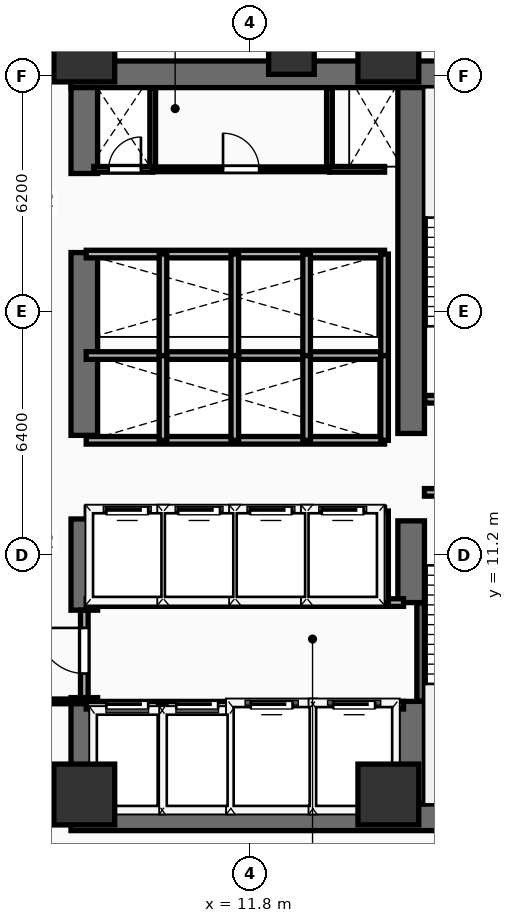
"""IFC4 building model, lengths in metres.
Left out: names, types, materials, properties, quantities, classifications, styles, units other than length and angle.
Written with IfcOpenShell. Run it as: python <this file> out.ifc"""

import sys

from ifc_helpers import new_model, si_unit, direction, frame, frame_2d, origin, origin_2d, place, context, subcontext, project, spatial, rectangle, extrude, element, fill, save


model = new_model("IFC4")
c1 = context("Model", 3, precision=1e-05, world=origin(), true_north=direction((0.0, 1.0)))
c2 = subcontext(c1, "Body", "Model", "MODEL_VIEW")
j1 = project(units=[si_unit("LENGTHUNIT", "METRE"), si_unit("PLANEANGLEUNIT", "RADIAN")], contexts=[c1])
p1 = place(None, origin())
s1 = spatial("IfcSite", under=j1, at=p1, CompositionType="ELEMENT")
p2 = place(p1, origin())
s2 = spatial("IfcBuilding", under=s1, at=p2, CompositionType="ELEMENT")
p3 = place(p2, frame((0.0, 0.0, 33.4)))
s3 = spatial("IfcBuildingStorey", under=s2, at=p3, CompositionType="ELEMENT", Elevation=33.4)
for number, where, z_axis, x_axis in (
    (1, (7.1, 4.3, 0.0), (0.0, 0.0, 1.0), (1.0, 0.0, 0.0)),
    (2, (7.1, 23.85, 0.0), (0.0, 0.0, 1.0), (1.0, 0.0, 0.0)),
):
    element("IfcWall", number, at=place(p3, frame(where, z_axis=z_axis, x_axis=x_axis)), inside=s3, PredefinedType="SHEAR", context=c2, shape_type="SweptSolid", body=[
        extrude(rectangle(XDim=14.05, YDim=0.7, at=frame_2d((7.025, 0.0))), origin(), (0.0, 0.0, 1.0), 3.54),
    ])
p4 = place(p3, frame((7.45, 4.65, 0.0), z_axis=(0.0, 0.0, 1.0), x_axis=(0.0, 1.0, 0.0)))
e3 = element("IfcWall", 3, at=p4, inside=s3, PredefinedType="SHEAR", context=c2, shape_type="SweptSolid", body=[
    extrude(rectangle(XDim=2.8, YDim=0.7, at=frame_2d((1.4, 0.0))), origin(), (0.0, 0.0, 1.0), 3.54),
])
p5 = place(p3, frame((7.45, 9.75, 0.0), z_axis=(0.0, 0.0, 1.0), x_axis=(0.0, 1.0, 0.0)))
e4 = element("IfcWall", 4, at=p5, inside=s3, PredefinedType="SHEAR", context=c2, shape_type="SweptSolid", body=[
    extrude(rectangle(XDim=2.4, YDim=0.7, at=frame_2d((1.2, 0.0))), origin(), (0.0, 0.0, 1.0), 3.54),
])
p6 = place(p3, frame((7.45, 14.35, 0.0), z_axis=(0.0, 0.0, 1.0), x_axis=(0.0, 1.0, 0.0)))
e5 = element("IfcWall", 5, at=p6, inside=s3, PredefinedType="SHEAR", context=c2, shape_type="SweptSolid", body=[
    extrude(rectangle(XDim=4.81, YDim=0.7, at=frame_2d((2.405, 0.0))), origin(), (0.0, 0.0, 1.0), 3.54),
])
p7 = place(p3, frame((7.45, 21.24, 0.0), z_axis=(0.0, 0.0, 1.0), x_axis=(0.0, 1.0, 0.0)))
e6 = element("IfcWall", 6, at=p7, inside=s3, PredefinedType="SHEAR", context=c2, shape_type="SweptSolid", body=[
    extrude(rectangle(XDim=2.26, YDim=0.7, at=frame_2d((1.13, 0.0))), origin(), (0.0, 0.0, 1.0), 3.54),
])
p8 = place(p3, frame((16.05, 4.65, 0.0), z_axis=(0.0, 0.0, 1.0), x_axis=(0.0, 1.0, 0.0)))
e7 = element("IfcWall", 7, at=p8, inside=s3, PredefinedType="SHEAR", context=c2, shape_type="SweptSolid", body=[
    extrude(rectangle(XDim=2.7, YDim=0.7, at=frame_2d((1.35, 0.0))), origin(), (0.0, 0.0, 1.0), 3.54),
])
p9 = place(p3, frame((16.05, 9.95, 0.0), z_axis=(0.0, 0.0, 1.0), x_axis=(0.0, 1.0, 0.0)))
e8 = element("IfcWall", 8, at=p9, inside=s3, PredefinedType="SHEAR", context=c2, shape_type="SweptSolid", body=[
    extrude(rectangle(XDim=2.15, YDim=0.7, at=frame_2d((1.075, 0.0))), origin(), (0.0, 0.0, 1.0), 3.54),
])
p10 = place(p3, frame((16.05, 14.4, 0.0), z_axis=(0.0, 0.0, 1.0), x_axis=(0.0, 1.0, 0.0)))
e9 = element("IfcWall", 9, at=p10, inside=s3, PredefinedType="SHEAR", context=c2, shape_type="SweptSolid", body=[
    extrude(rectangle(XDim=9.1, YDim=0.7, at=frame_2d((4.55, 0.0))), origin(), (0.0, 0.0, 1.0), 3.54),
])
for number, where, z_axis, x_axis in (
    (10, (7.45, 4.9, 0.0), (0.0, 0.0, 1.0), (1.0, 0.0, 0.0)),
    (11, (15.45, 4.9, 0.0), (0.0, 0.0, 1.0), (1.0, 0.0, 0.0)),
    (12, (7.45, 24.45, 0.0), (0.0, 0.0, 1.0), (1.0, 0.0, 0.0)),
    (13, (15.45, 24.45, 0.0), (0.0, 0.0, 1.0), (1.0, 0.0, 0.0)),
):
    element("IfcColumn", number, at=place(p3, frame(where, z_axis=z_axis, x_axis=x_axis)), inside=s3, PredefinedType="COLUMN", context=c2, shape_type="SweptSolid", body=[
        extrude(rectangle(XDim=1.6, YDim=1.6, at=origin_2d()), origin(), (0.0, 0.0, 1.0), 3.54),
    ])
p11 = place(p3, frame((12.9, 24.45, 0.0), z_axis=(0.0, 0.0, 1.0), x_axis=(1.0, 0.0, 0.0)))
e14 = element("IfcColumn", 14, at=p11, inside=s3, PredefinedType="COLUMN", context=c2, shape_type="SweptSolid", body=[
    extrude(rectangle(XDim=1.2, YDim=1.2, at=origin_2d()), origin(), (0.0, 0.0, 1.0), 3.54),
])
p12 = place(p3, frame((16.3, 7.36, 0.0), z_axis=(0.0, 0.0, 1.0), x_axis=(0.0, 1.0, 0.0)))
e15 = element("IfcWall", 15, at=p12, inside=s3, PredefinedType="SHEAR", context=c2, shape_type="SweptSolid", body=[
    extrude(rectangle(XDim=2.58, YDim=0.2, at=frame_2d((1.29, 0.0))), origin(), (0.0, 0.0, 1.0), 3.54),
])
p13 = place(p3, frame((16.4, 12.85, 0.0), z_axis=(0.0, 0.0, 1.0), x_axis=(1.0, 0.0, 0.0)))
e16 = element("IfcWall", 16, at=p13, inside=s3, PredefinedType="PARTITIONING", context=c2, shape_type="SweptSolid", body=[
    extrude(rectangle(XDim=3.96, YDim=0.2, at=frame_2d((1.98, 0.0))), origin(), (0.0, 0.0, 1.0), 3.54),
])
p14 = place(p13, frame((1.304, 0.0, 0.0)))
e17 = element("IfcOpeningElement", 17, at=p14, cuts=e16, PredefinedType="OPENING", context=c2, shape_type="SweptSolid", body=[
    extrude(rectangle(XDim=1.1, YDim=2.2, at=frame_2d((0.55, 1.1))), frame((0.0, 0.11, 0.0), z_axis=(0.0, -1.0, 0.0), x_axis=(1.0, 0.0, 0.0)), (0.0, 0.0, 1.0), 0.22),
])
p15 = place(p3, frame((16.41, 15.3, 0.0), z_axis=(0.0, 0.0, 1.0), x_axis=(1.0, 0.0, 0.0)))
e18 = element("IfcWall", 18, at=p15, inside=s3, PredefinedType="PARTITIONING", context=c2, shape_type="SweptSolid", body=[
    extrude(rectangle(XDim=3.95, YDim=0.2, at=frame_2d((1.975, 0.0))), origin(), (0.0, 0.0, 1.0), 3.54),
])
p16 = place(p15, frame((1.294, 0.0, 0.0)))
e19 = element("IfcOpeningElement", 19, at=p16, cuts=e18, PredefinedType="OPENING", context=c2, shape_type="SweptSolid", body=[
    extrude(rectangle(XDim=1.1, YDim=2.2, at=frame_2d((0.55, 1.1))), frame((0.0, 0.11, 0.0), z_axis=(0.0, -1.0, 0.0), x_axis=(1.0, 0.0, 0.0)), (0.0, 0.0, 1.0), 0.22),
])
p17 = place(p3, frame((7.5, 7.25, 0.0), z_axis=(0.0, 0.0, 1.0), x_axis=(1.0, 0.0, 0.0)))
e20 = element("IfcWall", 20, at=p17, inside=s3, PredefinedType="PARTITIONING", context=c2, shape_type="SweptSolid", body=[
    extrude(rectangle(XDim=8.35, YDim=0.2, at=frame_2d((4.175, 0.0))), origin(), (0.0, 0.0, 1.0), 3.54),
])
p18 = place(p17, frame((0.53, 0.0, 0.0)))
e21 = element("IfcOpeningElement", 21, at=p18, cuts=e20, PredefinedType="OPENING", context=c2, shape_type="SweptSolid", body=[
    extrude(rectangle(XDim=1.1, YDim=2.2, at=frame_2d((0.55, 1.1))), frame((0.0, 0.11, 0.0), z_axis=(0.0, -1.0, 0.0), x_axis=(1.0, 0.0, 0.0)), (0.0, 0.0, 1.0), 0.22),
])
p19 = place(p17, frame((2.37, 0.0, 0.0)))
e22 = element("IfcOpeningElement", 22, at=p19, cuts=e20, PredefinedType="OPENING", context=c2, shape_type="SweptSolid", body=[
    extrude(rectangle(XDim=1.1, YDim=2.2, at=frame_2d((0.55, 1.1))), frame((0.0, 0.11, 0.0), z_axis=(0.0, -1.0, 0.0), x_axis=(1.0, 0.0, 0.0)), (0.0, 0.0, 1.0), 0.22),
])
p20 = place(p17, frame((4.33, 0.0, 0.0)))
e23 = element("IfcOpeningElement", 23, at=p20, cuts=e20, PredefinedType="OPENING", context=c2, shape_type="SweptSolid", body=[
    extrude(rectangle(XDim=1.1, YDim=2.2, at=frame_2d((0.55, 1.1))), frame((0.0, 0.11, 0.0), z_axis=(0.0, -1.0, 0.0), x_axis=(1.0, 0.0, 0.0)), (0.0, 0.0, 1.0), 0.22),
])
p21 = place(p17, frame((6.5, 0.0, 0.0)))
e24 = element("IfcOpeningElement", 24, at=p21, cuts=e20, PredefinedType="OPENING", context=c2, shape_type="SweptSolid", body=[
    extrude(rectangle(XDim=1.1, YDim=2.2, at=frame_2d((0.55, 1.1))), frame((0.0, 0.11, 0.0), z_axis=(0.0, -1.0, 0.0), x_axis=(1.0, 0.0, 0.0)), (0.0, 0.0, 1.0), 0.22),
])
p22 = place(p3, frame((7.5, 9.95, 0.0), z_axis=(0.0, 0.0, 1.0), x_axis=(1.0, 0.0, 0.0)))
e25 = element("IfcWall", 25, at=p22, inside=s3, PredefinedType="PARTITIONING", context=c2, shape_type="SweptSolid", body=[
    extrude(rectangle(XDim=8.35, YDim=0.2, at=frame_2d((4.175, 0.0))), origin(), (0.0, 0.0, 1.0), 3.54),
])
for number, where, z_axis, x_axis in (
    (26, (9.5, 4.45, 0.0), (0.0, 0.0, 1.0), (0.0, 1.0, 0.0)),
    (27, (11.36, 4.45, 0.0), (0.0, 0.0, 1.0), (0.0, 1.0, 0.0)),
    (28, (13.46, 4.45, 0.0), (0.0, 0.0, 1.0), (0.0, 1.0, 0.0)),
):
    element("IfcWall", number, at=place(p3, frame(where, z_axis=z_axis, x_axis=x_axis)), inside=s3, PredefinedType="PARTITIONING", context=c2, shape_type="SweptSolid", body=[
        extrude(rectangle(XDim=2.8, YDim=0.2, at=frame_2d((1.4, 0.0))), origin(), (0.0, 0.0, 1.0), 3.54),
    ])
p23 = place(p3, frame((7.45, 7.45, 0.0), z_axis=(0.0, 0.0, 1.0), x_axis=(0.0, 1.0, 0.0)))
e29 = element("IfcWall", 29, at=p23, inside=s3, PredefinedType="PARTITIONING", context=c2, shape_type="SweptSolid", body=[
    extrude(rectangle(XDim=2.3, YDim=0.2, at=frame_2d((1.15, 0.0))), origin(), (0.0, 0.0, 1.0), 2.52),
])
p24 = place(p23, frame((0.633, 0.0, 0.0)))
e30 = element("IfcOpeningElement", 30, at=p24, cuts=e29, PredefinedType="OPENING", context=c2, shape_type="SweptSolid", body=[
    extrude(rectangle(XDim=1.2, YDim=2.25, at=frame_2d((0.6, 1.125))), frame((0.0, 0.11, 0.0), z_axis=(0.0, -1.0, 0.0), x_axis=(1.0, 0.0, 0.0)), (0.0, 0.0, 1.0), 0.22),
])
p25 = place(p3, frame((7.5, 12.36, 0.0), z_axis=(0.0, 0.0, 1.0), x_axis=(1.0, 0.0, 0.0)))
e31 = element("IfcWall", 31, at=p25, inside=s3, PredefinedType="PARTITIONING", context=c2, shape_type="SweptSolid", body=[
    extrude(rectangle(XDim=7.85, YDim=0.2, at=frame_2d((3.925, 0.0))), origin(), (0.0, 0.0, 1.0), 3.54),
])
p26 = place(p25, frame((0.53, 0.0, 0.0)))
e32 = element("IfcOpeningElement", 32, at=p26, cuts=e31, PredefinedType="OPENING", context=c2, shape_type="SweptSolid", body=[
    extrude(rectangle(XDim=1.1, YDim=2.2, at=frame_2d((0.55, 1.1))), frame((0.0, 0.11, 0.0), z_axis=(0.0, -1.0, 0.0), x_axis=(1.0, 0.0, 0.0)), (0.0, 0.0, 1.0), 0.22),
])
p27 = place(p25, frame((2.42, 0.0, 0.0)))
e33 = element("IfcOpeningElement", 33, at=p27, cuts=e31, PredefinedType="OPENING", context=c2, shape_type="SweptSolid", body=[
    extrude(rectangle(XDim=1.1, YDim=2.2, at=frame_2d((0.55, 1.1))), frame((0.0, 0.11, 0.0), z_axis=(0.0, -1.0, 0.0), x_axis=(1.0, 0.0, 0.0)), (0.0, 0.0, 1.0), 0.22),
])
p28 = place(p25, frame((4.31, 0.0, 0.0)))
e34 = element("IfcOpeningElement", 34, at=p28, cuts=e31, PredefinedType="OPENING", context=c2, shape_type="SweptSolid", body=[
    extrude(rectangle(XDim=1.1, YDim=2.2, at=frame_2d((0.55, 1.1))), frame((0.0, 0.11, 0.0), z_axis=(0.0, -1.0, 0.0), x_axis=(1.0, 0.0, 0.0)), (0.0, 0.0, 1.0), 0.22),
])
p29 = place(p25, frame((6.2, 0.0, 0.0)))
e35 = element("IfcOpeningElement", 35, at=p29, cuts=e31, PredefinedType="OPENING", context=c2, shape_type="SweptSolid", body=[
    extrude(rectangle(XDim=1.1, YDim=2.2, at=frame_2d((0.55, 1.1))), frame((0.0, 0.11, 0.0), z_axis=(0.0, -1.0, 0.0), x_axis=(1.0, 0.0, 0.0)), (0.0, 0.0, 1.0), 0.22),
])
for number, where, z_axis, x_axis in (
    (36, (15.35, 9.95, 0.0), (0.0, 0.0, 1.0), (0.0, 1.0, 0.0)),
    (37, (9.52, 9.95, 0.0), (0.0, 0.0, 1.0), (0.0, 1.0, 0.0)),
    (38, (11.41, 9.95, 0.0), (0.0, 0.0, 1.0), (0.0, 1.0, 0.0)),
    (39, (13.3, 9.95, 0.0), (0.0, 0.0, 1.0), (0.0, 1.0, 0.0)),
):
    element("IfcWall", number, at=place(p3, frame(where, z_axis=z_axis, x_axis=x_axis)), inside=s3, PredefinedType="PARTITIONING", context=c2, shape_type="SweptSolid", body=[
        extrude(rectangle(XDim=2.41, YDim=0.2, at=frame_2d((1.205, 0.0))), origin(), (0.0, 0.0, 1.0), 3.54),
    ])
for number, where, z_axis, x_axis in (
    (40, (7.5, 14.22, 0.0), (0.0, 0.0, 1.0), (1.0, 0.0, 0.0)),
    (41, (7.5, 16.45, 0.0), (0.0, 0.0, 1.0), (1.0, 0.0, 0.0)),
):
    element("IfcWall", number, at=place(p3, frame(where, z_axis=z_axis, x_axis=x_axis)), inside=s3, PredefinedType="PARTITIONING", context=c2, shape_type="SweptSolid", body=[
        extrude(rectangle(XDim=7.85, YDim=0.2, at=frame_2d((3.925, 0.0))), origin(), (0.0, 0.0, 1.0), 3.54),
    ])
for number, where, z_axis, x_axis in (
    (42, (15.35, 14.22, 0.0), (0.0, 0.0, 1.0), (0.0, 1.0, 0.0)),
    (43, (9.52, 14.22, 0.0), (0.0, 0.0, 1.0), (0.0, 1.0, 0.0)),
    (44, (11.41, 14.22, 0.0), (0.0, 0.0, 1.0), (0.0, 1.0, 0.0)),
    (45, (13.3, 14.22, 0.0), (0.0, 0.0, 1.0), (0.0, 1.0, 0.0)),
):
    element("IfcWall", number, at=place(p3, frame(where, z_axis=z_axis, x_axis=x_axis)), inside=s3, PredefinedType="PARTITIONING", context=c2, shape_type="SweptSolid", body=[
        extrude(rectangle(XDim=2.23, YDim=0.2, at=frame_2d((1.115, 0.0))), origin(), (0.0, 0.0, 1.0), 3.54),
    ])
p30 = place(p3, frame((7.5, 19.12, 0.0), z_axis=(0.0, 0.0, 1.0), x_axis=(1.0, 0.0, 0.0)))
e46 = element("IfcWall", 46, at=p30, inside=s3, PredefinedType="PARTITIONING", context=c2, shape_type="SweptSolid", body=[
    extrude(rectangle(XDim=7.85, YDim=0.2, at=frame_2d((3.925, 0.0))), origin(), (0.0, 0.0, 1.0), 3.54),
])
for number, where, z_axis, x_axis in (
    (47, (15.35, 16.45, 0.0), (0.0, 0.0, 1.0), (0.0, 1.0, 0.0)),
    (48, (9.52, 16.45, 0.0), (0.0, 0.0, 1.0), (0.0, 1.0, 0.0)),
    (49, (11.41, 16.45, 0.0), (0.0, 0.0, 1.0), (0.0, 1.0, 0.0)),
    (50, (13.3, 16.45, 0.0), (0.0, 0.0, 1.0), (0.0, 1.0, 0.0)),
):
    element("IfcWall", number, at=place(p3, frame(where, z_axis=z_axis, x_axis=x_axis)), inside=s3, PredefinedType="PARTITIONING", context=c2, shape_type="SweptSolid", body=[
        extrude(rectangle(XDim=2.67, YDim=0.2, at=frame_2d((1.335, 0.0))), origin(), (0.0, 0.0, 1.0), 3.54),
    ])
for number, where, z_axis, x_axis in (
    (51, (9.25, 21.35, 0.0), (0.0, 0.0, 1.0), (0.0, 1.0, 0.0)),
    (52, (13.9, 21.35, 0.0), (0.0, 0.0, 1.0), (0.0, 1.0, 0.0)),
):
    element("IfcWall", number, at=place(p3, frame(where, z_axis=z_axis, x_axis=x_axis)), inside=s3, PredefinedType="PARTITIONING", context=c2, shape_type="SweptSolid", body=[
        extrude(rectangle(XDim=2.13, YDim=0.15, at=frame_2d((1.065, 0.0))), origin(), (0.0, 0.0, 1.0), 3.54),
    ])
p31 = place(p3, frame((7.7, 21.35, 0.0), z_axis=(0.0, 0.0, 1.0), x_axis=(1.0, 0.0, 0.0)))
e53 = element("IfcWall", 53, at=p31, inside=s3, PredefinedType="PARTITIONING", context=c2, shape_type="SweptSolid", body=[
    extrude(rectangle(XDim=1.55, YDim=0.15, at=frame_2d((0.775, 0.0))), origin(), (0.0, 0.0, 1.0), 3.54),
])
p32 = place(p31, frame((0.39, 0.0, 0.0)))
e54 = element("IfcOpeningElement", 54, at=p32, cuts=e53, PredefinedType="OPENING", context=c2, shape_type="SweptSolid", body=[
    extrude(rectangle(XDim=0.85, YDim=2.15, at=frame_2d((0.425, 1.075))), frame((0.0, 0.085, 0.0), z_axis=(0.0, -1.0, 0.0), x_axis=(1.0, 0.0, 0.0)), (0.0, 0.0, 1.0), 0.17),
])
p33 = place(p3, frame((13.9, 21.35, 0.0), z_axis=(0.0, 0.0, 1.0), x_axis=(1.0, 0.0, 0.0)))
e55 = element("IfcWall", 55, at=p33, inside=s3, PredefinedType="PARTITIONING", context=c2, shape_type="SweptSolid", body=[
    extrude(rectangle(XDim=1.45, YDim=0.15, at=frame_2d((0.725, 0.0))), origin(), (0.0, 0.0, 1.0), 3.54),
])
p34 = place(p3, frame((9.25, 21.35, 0.0), z_axis=(0.0, 0.0, 1.0), x_axis=(1.0, 0.0, 0.0)))
e56 = element("IfcWall", 56, at=p34, inside=s3, PredefinedType="PARTITIONING", context=c2, shape_type="SweptSolid", body=[
    extrude(rectangle(XDim=4.65, YDim=0.125, at=frame_2d((2.325, 0.0))), origin(), (0.0, 0.0, 1.0), 3.54),
])
p35 = place(p34, frame((1.85, 0.0, 0.0)))
e57 = element("IfcOpeningElement", 57, at=p35, cuts=e56, PredefinedType="OPENING", context=c2, shape_type="SweptSolid", body=[
    extrude(rectangle(XDim=0.95, YDim=2.15, at=frame_2d((0.475, 1.075))), frame((0.0, 0.073, 0.0), z_axis=(0.0, -1.0, 0.0), x_axis=(1.0, 0.0, 0.0)), (0.0, 0.0, 1.0), 0.145),
])
p36 = place(p3, frame((1.64, 7.35, 0.0), z_axis=(0.0, 0.0, 1.0), x_axis=(1.0, 0.0, 0.0)))
e58 = element("IfcWall", 58, at=p36, inside=s3, PredefinedType="PARTITIONING", context=c2, shape_type="SweptSolid", body=[
    extrude(rectangle(XDim=5.76, YDim=0.125, at=frame_2d((2.88, 0.0))), origin(), (0.0, 0.0, 1.0), 3.54),
])
p37 = place(p36, frame((4.087, 0.0, 0.0)))
e59 = element("IfcOpeningElement", 59, at=p37, cuts=e58, PredefinedType="OPENING", context=c2, shape_type="SweptSolid", body=[
    extrude(rectangle(XDim=0.85, YDim=2.15, at=frame_2d((0.425, 1.075))), frame((0.0, 0.073, 0.0), z_axis=(0.0, -1.0, 0.0), x_axis=(1.0, 0.0, 0.0)), (0.0, 0.0, 1.0), 0.145),
])
p38 = place(p18, origin())
e60 = element("IfcDoor", 60, at=p38, inside=s3, OperationType="SLIDING_TO_LEFT", PredefinedType="DOOR", context=c2, shape_type="SweptSolid", body=[
    extrude(rectangle(XDim=1.1, YDim=2.2, at=frame_2d((0.55, 1.1))), frame((0.0, 0.025, 0.0), z_axis=(0.0, -1.0, 0.0), x_axis=(1.0, 0.0, 0.0)), (0.0, 0.0, 1.0), 0.05),
])
fill(e21, e60)
p39 = place(p19, origin())
e61 = element("IfcDoor", 61, at=p39, inside=s3, OperationType="SLIDING_TO_LEFT", PredefinedType="DOOR", context=c2, shape_type="SweptSolid", body=[
    extrude(rectangle(XDim=1.1, YDim=2.2, at=frame_2d((0.55, 1.1))), frame((0.0, 0.025, 0.0), z_axis=(0.0, -1.0, 0.0), x_axis=(1.0, 0.0, 0.0)), (0.0, 0.0, 1.0), 0.05),
])
fill(e22, e61)
p40 = place(p20, origin())
e62 = element("IfcDoor", 62, at=p40, inside=s3, OperationType="SLIDING_TO_LEFT", PredefinedType="DOOR", context=c2, shape_type="SweptSolid", body=[
    extrude(rectangle(XDim=1.1, YDim=2.2, at=frame_2d((0.55, 1.1))), frame((0.0, 0.025, 0.0), z_axis=(0.0, -1.0, 0.0), x_axis=(1.0, 0.0, 0.0)), (0.0, 0.0, 1.0), 0.05),
])
fill(e23, e62)
p41 = place(p21, origin())
e63 = element("IfcDoor", 63, at=p41, inside=s3, OperationType="SLIDING_TO_LEFT", PredefinedType="DOOR", context=c2, shape_type="SweptSolid", body=[
    extrude(rectangle(XDim=1.1, YDim=2.2, at=frame_2d((0.55, 1.1))), frame((0.0, 0.025, 0.0), z_axis=(0.0, -1.0, 0.0), x_axis=(1.0, 0.0, 0.0)), (0.0, 0.0, 1.0), 0.05),
])
fill(e24, e63)
p42 = place(p24, frame((1.2, 0.0, 0.0), z_axis=(0.0, 0.0, 1.0), x_axis=(-1.0, 0.0, 0.0)))
e64 = element("IfcDoor", 64, at=p42, inside=s3, OperationType="SINGLE_SWING_LEFT", PredefinedType="DOOR", context=c2, shape_type="SweptSolid", body=[
    extrude(rectangle(XDim=1.2, YDim=2.25, at=frame_2d((0.6, 1.125))), frame((0.0, 0.025, 0.0), z_axis=(0.0, -1.0, 0.0), x_axis=(1.0, 0.0, 0.0)), (0.0, 0.0, 1.0), 0.05),
])
fill(e30, e64)
p43 = place(p26, origin())
e65 = element("IfcDoor", 65, at=p43, inside=s3, OperationType="SLIDING_TO_LEFT", PredefinedType="DOOR", context=c2, shape_type="SweptSolid", body=[
    extrude(rectangle(XDim=1.1, YDim=2.2, at=frame_2d((0.55, 1.1))), frame((0.0, 0.025, 0.0), z_axis=(0.0, -1.0, 0.0), x_axis=(1.0, 0.0, 0.0)), (0.0, 0.0, 1.0), 0.05),
])
fill(e32, e65)
p44 = place(p27, origin())
e66 = element("IfcDoor", 66, at=p44, inside=s3, OperationType="SLIDING_TO_LEFT", PredefinedType="DOOR", context=c2, shape_type="SweptSolid", body=[
    extrude(rectangle(XDim=1.1, YDim=2.2, at=frame_2d((0.55, 1.1))), frame((0.0, 0.025, 0.0), z_axis=(0.0, -1.0, 0.0), x_axis=(1.0, 0.0, 0.0)), (0.0, 0.0, 1.0), 0.05),
])
fill(e33, e66)
p45 = place(p28, origin())
e67 = element("IfcDoor", 67, at=p45, inside=s3, OperationType="SLIDING_TO_LEFT", PredefinedType="DOOR", context=c2, shape_type="SweptSolid", body=[
    extrude(rectangle(XDim=1.1, YDim=2.2, at=frame_2d((0.55, 1.1))), frame((0.0, 0.025, 0.0), z_axis=(0.0, -1.0, 0.0), x_axis=(1.0, 0.0, 0.0)), (0.0, 0.0, 1.0), 0.05),
])
fill(e34, e67)
p46 = place(p29, origin())
e68 = element("IfcDoor", 68, at=p46, inside=s3, OperationType="SLIDING_TO_LEFT", PredefinedType="DOOR", context=c2, shape_type="SweptSolid", body=[
    extrude(rectangle(XDim=1.1, YDim=2.2, at=frame_2d((0.55, 1.1))), frame((0.0, 0.025, 0.0), z_axis=(0.0, -1.0, 0.0), x_axis=(1.0, 0.0, 0.0)), (0.0, 0.0, 1.0), 0.05),
])
fill(e35, e68)
p47 = place(p32, origin())
e69 = element("IfcDoor", 69, at=p47, inside=s3, OperationType="SINGLE_SWING_RIGHT", PredefinedType="DOOR", context=c2, shape_type="SweptSolid", body=[
    extrude(rectangle(XDim=0.85, YDim=2.15, at=frame_2d((0.425, 1.075))), frame((0.0, 0.025, 0.0), z_axis=(0.0, -1.0, 0.0), x_axis=(1.0, 0.0, 0.0)), (0.0, 0.0, 1.0), 0.05),
])
fill(e54, e69)
p48 = place(p35, origin())
e70 = element("IfcDoor", 70, at=p48, inside=s3, OperationType="SINGLE_SWING_LEFT", PredefinedType="DOOR", context=c2, shape_type="SweptSolid", body=[
    extrude(rectangle(XDim=0.95, YDim=2.15, at=frame_2d((0.475, 1.075))), frame((0.0, 0.025, 0.0), z_axis=(0.0, -1.0, 0.0), x_axis=(1.0, 0.0, 0.0)), (0.0, 0.0, 1.0), 0.05),
])
fill(e57, e70)
save(model, sys.argv[1])
